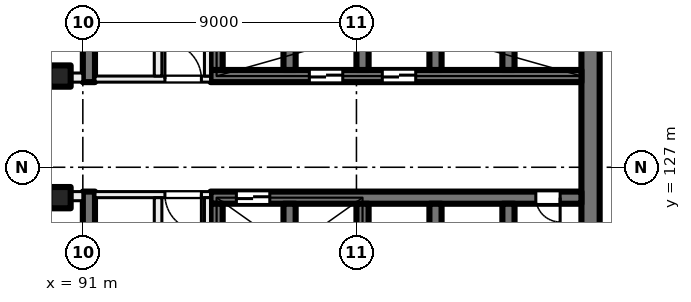
"""IFC4 building model, lengths in metres.
Left out: names, types, materials, properties, quantities, classifications, styles, units other than length and angle.
Written with IfcOpenShell. Run it as: python <this file> out.ifc"""

import sys

from ifc_helpers import new_model, si_unit, direction, frame, frame_2d, origin, origin_2d, place, context, subcontext, project, spatial, rectangle, extrude, element, fill, save


model = new_model("IFC4")
c1 = context("Model", 3, precision=1e-05, world=origin(), true_north=direction((0.0, 1.0)))
c2 = subcontext(c1, "Body", "Model", "MODEL_VIEW")
j1 = project(units=[si_unit("LENGTHUNIT", "METRE"), si_unit("PLANEANGLEUNIT", "RADIAN")], contexts=[c1])
p1 = place(None, origin())
s1 = spatial("IfcSite", under=j1, at=p1, CompositionType="ELEMENT")
p2 = place(p1, origin())
s2 = spatial("IfcBuilding", under=s1, at=p2, CompositionType="ELEMENT")
p3 = place(p2, frame((0.0, 0.0, 67.5)))
s3 = spatial("IfcBuildingStorey", under=s2, at=p3, CompositionType="ELEMENT", Elevation=67.5)
for number, where, z_axis, x_axis in (
    (1, (90.25, 130.0, 0.0), (0.0, 0.0, 1.0), (1.0, 0.0, 0.0)),
    (2, (90.25, 126.0, 0.0), (0.0, 0.0, 1.0), (1.0, 0.0, 0.0)),
):
    element("IfcColumn", number, at=place(p3, frame(where, z_axis=z_axis, x_axis=x_axis)), inside=s3, PredefinedType="COLUMN", context=c2, shape_type="SweptSolid", body=[
        extrude(rectangle(XDim=0.7, YDim=0.7, at=origin_2d()), origin(), (0.0, 0.0, 1.0), 4.0),
    ])
p4 = place(p3, frame((107.7, 135.2, 0.0), z_axis=(0.0, 0.0, 1.0), x_axis=(0.0, -1.0, 0.0)))
e3 = element("IfcWall", 3, at=p4, inside=s3, PredefinedType="SHEAR", context=c2, shape_type="SweptSolid", body=[
    extrude(rectangle(XDim=14.4, YDim=0.6, at=frame_2d((7.2, 0.0))), origin(), (0.0, 0.0, 1.0), 4.0),
])
p5 = place(p3, frame((107.4, 130.0, 0.0), z_axis=(0.0, 0.0, 1.0), x_axis=(-1.0, 0.0, 0.0)))
e4 = element("IfcWall", 4, at=p5, inside=s3, PredefinedType="SHEAR", context=c2, shape_type="SweptSolid", body=[
    extrude(rectangle(XDim=12.2, YDim=0.4, at=frame_2d((6.1, 0.0))), origin(), (0.0, 0.0, 1.0), 4.0),
])
p6 = place(p5, frame((5.45, 0.0, 0.0)))
e5 = element("IfcOpeningElement", 5, at=p6, cuts=e4, PredefinedType="OPENING", context=c2, shape_type="SweptSolid", body=[
    extrude(rectangle(XDim=1.1, YDim=2.1, at=frame_2d((0.55, 1.05))), frame((0.0, 0.21, 0.0), z_axis=(0.0, -1.0, 0.0), x_axis=(1.0, 0.0, 0.0)), (0.0, 0.0, 1.0), 0.42),
])
p7 = place(p5, frame((7.85, 0.0, 0.0)))
e6 = element("IfcOpeningElement", 6, at=p7, cuts=e4, PredefinedType="OPENING", context=c2, shape_type="SweptSolid", body=[
    extrude(rectangle(XDim=1.1, YDim=2.1, at=frame_2d((0.55, 1.05))), frame((0.0, 0.21, 0.0), z_axis=(0.0, -1.0, 0.0), x_axis=(1.0, 0.0, 0.0)), (0.0, 0.0, 1.0), 0.42),
])
for number, where, z_axis, x_axis in (
    (7, (105.0, 133.2, 0.0), (0.0, 0.0, 1.0), (0.0, -1.0, 0.0)),
    (8, (102.6, 133.2, 0.0), (0.0, 0.0, 1.0), (0.0, -1.0, 0.0)),
    (9, (100.2, 133.2, 0.0), (0.0, 0.0, 1.0), (0.0, -1.0, 0.0)),
    (10, (97.8, 133.2, 0.0), (0.0, 0.0, 1.0), (0.0, -1.0, 0.0)),
    (11, (95.4, 133.2, 0.0), (0.0, 0.0, 1.0), (0.0, -1.0, 0.0)),
):
    element("IfcWall", number, at=place(p3, frame(where, z_axis=z_axis, x_axis=x_axis)), inside=s3, PredefinedType="SHEAR", context=c2, shape_type="SweptSolid", body=[
        extrude(rectangle(XDim=3.0, YDim=0.4, at=frame_2d((1.5, 0.0))), origin(), (0.0, 0.0, 1.0), 4.0),
    ])
p8 = place(p3, frame((107.4, 126.0, 0.0), z_axis=(0.0, 0.0, 1.0), x_axis=(-1.0, 0.0, 0.0)))
e12 = element("IfcWall", 12, at=p8, inside=s3, PredefinedType="SHEAR", context=c2, shape_type="SweptSolid", body=[
    extrude(rectangle(XDim=12.2, YDim=0.4, at=frame_2d((6.1, 0.0))), origin(), (0.0, 0.0, 1.0), 4.0),
])
p9 = place(p8, frame((10.25, 0.0, 0.0)))
e13 = element("IfcOpeningElement", 13, at=p9, cuts=e12, PredefinedType="OPENING", context=c2, shape_type="SweptSolid", body=[
    extrude(rectangle(XDim=1.1, YDim=2.1, at=frame_2d((0.55, 1.05))), frame((0.0, 0.21, 0.0), z_axis=(0.0, -1.0, 0.0), x_axis=(1.0, 0.0, 0.0)), (0.0, 0.0, 1.0), 0.42),
])
p10 = place(p8, frame((0.7, 0.0, 0.0)))
e14 = element("IfcOpeningElement", 14, at=p10, cuts=e12, PredefinedType="OPENING", context=c2, shape_type="SweptSolid", body=[
    extrude(rectangle(XDim=0.8, YDim=2.1, at=frame_2d((0.4, 1.05))), frame((0.0, 0.21, 0.0), z_axis=(0.0, -1.0, 0.0), x_axis=(1.0, 0.0, 0.0)), (0.0, 0.0, 1.0), 0.42),
])
for number, where, z_axis, x_axis in (
    (15, (105.0, 125.8, 0.0), (0.0, 0.0, 1.0), (0.0, -1.0, 0.0)),
    (16, (102.6, 125.8, 0.0), (0.0, 0.0, 1.0), (0.0, -1.0, 0.0)),
    (17, (100.2, 125.8, 0.0), (0.0, 0.0, 1.0), (0.0, -1.0, 0.0)),
    (18, (97.8, 125.8, 0.0), (0.0, 0.0, 1.0), (0.0, -1.0, 0.0)),
    (19, (95.4, 125.8, 0.0), (0.0, 0.0, 1.0), (0.0, -1.0, 0.0)),
):
    element("IfcWall", number, at=place(p3, frame(where, z_axis=z_axis, x_axis=x_axis)), inside=s3, PredefinedType="SHEAR", context=c2, shape_type="SweptSolid", body=[
        extrude(rectangle(XDim=3.0, YDim=0.4, at=frame_2d((1.5, 0.0))), origin(), (0.0, 0.0, 1.0), 4.0),
    ])
for number, where, z_axis, x_axis in (
    (20, (91.2, 138.4, 0.0), (0.0, 0.0, 1.0), (0.0, -1.0, 0.0)),
    (21, (91.2, 126.2, 0.0), (0.0, 0.0, 1.0), (0.0, -1.0, 0.0)),
):
    element("IfcWall", number, at=place(p3, frame(where, z_axis=z_axis, x_axis=x_axis)), inside=s3, PredefinedType="SHEAR", context=c2, shape_type="SweptSolid", body=[
        extrude(rectangle(XDim=8.6, YDim=0.4, at=frame_2d((4.3, 0.0))), origin(), (0.0, 0.0, 1.0), 4.0),
    ])
p11 = place(p3, frame((95.2, 126.1, 0.0), z_axis=(0.0, 0.0, 1.0), x_axis=(-1.0, 0.0, 0.0)))
e22 = element("IfcWall", 22, at=p11, inside=s3, PredefinedType="PARTITIONING", context=c2, shape_type="SweptSolid", body=[
    extrude(rectangle(XDim=3.8, YDim=0.2, at=frame_2d((1.9, 0.0))), origin(), (0.0, 0.0, 1.0), 3.625),
])
p12 = place(p11, frame((0.3, 0.0, 0.0)))
e23 = element("IfcOpeningElement", 23, at=p12, cuts=e22, PredefinedType="OPENING", context=c2, shape_type="SweptSolid", body=[
    extrude(rectangle(XDim=1.2, YDim=2.1, at=frame_2d((0.6, 1.05))), frame((0.0, 0.11, 0.0), z_axis=(0.0, -1.0, 0.0), x_axis=(1.0, 0.0, 0.0)), (0.0, 0.0, 1.0), 0.22),
])
p13 = place(p3, frame((95.1, 117.6, 0.0), z_axis=(0.0, 0.0, 1.0), x_axis=(0.0, 1.0, 0.0)))
e24 = element("IfcWall", 24, at=p13, inside=s3, PredefinedType="PARTITIONING", context=c2, shape_type="SweptSolid", body=[
    extrude(rectangle(XDim=8.4, YDim=0.2, at=frame_2d((4.2, 0.0))), origin(), (0.0, 0.0, 1.0), 3.625),
])
p14 = place(p13, frame((1.65, 0.0, 0.0)))
e25 = element("IfcOpeningElement", 25, at=p14, cuts=e24, PredefinedType="OPENING", context=c2, shape_type="SweptSolid", body=[
    extrude(rectangle(XDim=1.5, YDim=2.1, at=frame_2d((0.75, 1.05))), frame((0.0, 0.11, 0.0), z_axis=(0.0, -1.0, 0.0), x_axis=(1.0, 0.0, 0.0)), (0.0, 0.0, 1.0), 0.22),
])
p15 = place(p3, frame((93.475, 117.6, 0.0), z_axis=(0.0, 0.0, 1.0), x_axis=(0.0, 1.0, 0.0)))
e26 = element("IfcWall", 26, at=p15, inside=s3, PredefinedType="PARTITIONING", context=c2, shape_type="SweptSolid", body=[
    extrude(rectangle(XDim=8.4, YDim=0.25, at=frame_2d((4.2, 0.0))), origin(), (0.0, 0.0, 1.0), 3.625),
])
p16 = place(p15, frame((5.825, 0.0, 0.0)))
e27 = element("IfcOpeningElement", 27, at=p16, cuts=e26, PredefinedType="OPENING", context=c2, shape_type="SweptSolid", body=[
    extrude(rectangle(XDim=1.0, YDim=2.1, at=frame_2d((0.5, 1.05))), frame((0.0, 0.135, 0.0), z_axis=(0.0, -1.0, 0.0), x_axis=(1.0, 0.0, 0.0)), (0.0, 0.0, 1.0), 0.27),
])
p17 = place(p15, frame((1.675, 0.0, 0.0)))
e28 = element("IfcOpeningElement", 28, at=p17, cuts=e26, PredefinedType="OPENING", context=c2, shape_type="SweptSolid", body=[
    extrude(rectangle(XDim=0.8, YDim=2.1, at=frame_2d((0.4, 1.05))), frame((0.0, 0.135, 0.0), z_axis=(0.0, -1.0, 0.0), x_axis=(1.0, 0.0, 0.0)), (0.0, 0.0, 1.0), 0.27),
])
p18 = place(p3, frame((91.4, 129.9, 0.0), z_axis=(0.0, 0.0, 1.0), x_axis=(1.0, 0.0, 0.0)))
e29 = element("IfcWall", 29, at=p18, inside=s3, PredefinedType="PARTITIONING", context=c2, shape_type="SweptSolid", body=[
    extrude(rectangle(XDim=3.8, YDim=0.2, at=frame_2d((1.9, 0.0))), origin(), (0.0, 0.0, 1.0), 3.625),
])
p19 = place(p18, frame((2.3, 0.0, 0.0)))
e30 = element("IfcOpeningElement", 30, at=p19, cuts=e29, PredefinedType="OPENING", context=c2, shape_type="SweptSolid", body=[
    extrude(rectangle(XDim=1.2, YDim=2.1, at=frame_2d((0.6, 1.05))), frame((0.0, 0.11, 0.0), z_axis=(0.0, -1.0, 0.0), x_axis=(1.0, 0.0, 0.0)), (0.0, 0.0, 1.0), 0.22),
])
p20 = place(p3, frame((95.1, 130.0, 0.0), z_axis=(0.0, 0.0, 1.0), x_axis=(0.0, 1.0, 0.0)))
e31 = element("IfcWall", 31, at=p20, inside=s3, PredefinedType="PARTITIONING", context=c2, shape_type="SweptSolid", body=[
    extrude(rectangle(XDim=8.4, YDim=0.2, at=frame_2d((4.2, 0.0))), origin(), (0.0, 0.0, 1.0), 3.625),
])
p21 = place(p20, frame((5.25, 0.0, 0.0)))
e32 = element("IfcOpeningElement", 32, at=p21, cuts=e31, PredefinedType="OPENING", context=c2, shape_type="SweptSolid", body=[
    extrude(rectangle(XDim=1.5, YDim=2.1, at=frame_2d((0.75, 1.05))), frame((0.0, 0.11, 0.0), z_axis=(0.0, -1.0, 0.0), x_axis=(1.0, 0.0, 0.0)), (0.0, 0.0, 1.0), 0.22),
])
p22 = place(p3, frame((93.475, 130.0, 0.0), z_axis=(0.0, 0.0, 1.0), x_axis=(0.0, 1.0, 0.0)))
e33 = element("IfcWall", 33, at=p22, inside=s3, PredefinedType="PARTITIONING", context=c2, shape_type="SweptSolid", body=[
    extrude(rectangle(XDim=8.4, YDim=0.25, at=frame_2d((4.2, 0.0))), origin(), (0.0, 0.0, 1.0), 3.625),
])
p23 = place(p22, frame((1.675, 0.0, 0.0)))
e34 = element("IfcOpeningElement", 34, at=p23, cuts=e33, PredefinedType="OPENING", context=c2, shape_type="SweptSolid", body=[
    extrude(rectangle(XDim=0.8, YDim=2.1, at=frame_2d((0.4, 1.05))), frame((0.0, 0.135, 0.0), z_axis=(0.0, -1.0, 0.0), x_axis=(1.0, 0.0, 0.0)), (0.0, 0.0, 1.0), 0.27),
])
p24 = place(p22, frame((5.825, 0.0, 0.0)))
e35 = element("IfcOpeningElement", 35, at=p24, cuts=e33, PredefinedType="OPENING", context=c2, shape_type="SweptSolid", body=[
    extrude(rectangle(XDim=1.0, YDim=2.1, at=frame_2d((0.5, 1.05))), frame((0.0, 0.135, 0.0), z_axis=(0.0, -1.0, 0.0), x_axis=(1.0, 0.0, 0.0)), (0.0, 0.0, 1.0), 0.27),
])
p25 = place(p3, frame((72.5, 129.95, 0.0), z_axis=(0.0, 0.0, 1.0), x_axis=(1.0, 0.0, 0.0)))
e36 = element("IfcWall", 36, at=p25, inside=s3, PredefinedType="PARTITIONING", context=c2, shape_type="SweptSolid", body=[
    extrude(rectangle(XDim=18.5, YDim=0.3, at=frame_2d((9.25, 0.0))), origin(), (0.0, 0.0, 1.0), 3.625),
])
p26 = place(p25, frame((10.475, 0.0, 0.0)))
e37 = element("IfcOpeningElement", 37, at=p26, cuts=e36, PredefinedType="OPENING", context=c2, shape_type="SweptSolid", body=[
    extrude(rectangle(XDim=1.8, YDim=2.1, at=frame_2d((0.9, 1.05))), frame((0.0, 0.16, 0.0), z_axis=(0.0, -1.0, 0.0), x_axis=(1.0, 0.0, 0.0)), (0.0, 0.0, 1.0), 0.32),
])
p27 = place(p25, frame((1.225, 0.0, 0.0)))
e38 = element("IfcOpeningElement", 38, at=p27, cuts=e36, PredefinedType="OPENING", context=c2, shape_type="SweptSolid", body=[
    extrude(rectangle(XDim=1.8, YDim=2.1, at=frame_2d((0.9, 1.05))), frame((0.0, 0.16, 0.0), z_axis=(0.0, -1.0, 0.0), x_axis=(1.0, 0.0, 0.0)), (0.0, 0.0, 1.0), 0.32),
])
p28 = place(p3, frame((91.0, 126.05, 0.0), z_axis=(0.0, 0.0, 1.0), x_axis=(-1.0, 0.0, 0.0)))
e39 = element("IfcWall", 39, at=p28, inside=s3, PredefinedType="PARTITIONING", context=c2, shape_type="SweptSolid", body=[
    extrude(rectangle(XDim=43.785, YDim=0.3, at=frame_2d((21.893, 0.0))), origin(), (0.0, 0.0, 1.0), 3.625),
])
p29 = place(p28, frame((2.125, 0.0, 0.0)))
e40 = element("IfcOpeningElement", 40, at=p29, cuts=e39, PredefinedType="OPENING", context=c2, shape_type="SweptSolid", body=[
    extrude(rectangle(XDim=1.0, YDim=2.1, at=frame_2d((0.5, 1.05))), frame((0.0, 0.16, 0.0), z_axis=(0.0, -1.0, 0.0), x_axis=(1.0, 0.0, 0.0)), (0.0, 0.0, 1.0), 0.32),
])
p30 = place(p28, frame((7.0, 0.0, 0.0)))
e41 = element("IfcOpeningElement", 41, at=p30, cuts=e39, PredefinedType="OPENING", context=c2, shape_type="SweptSolid", body=[
    extrude(rectangle(XDim=1.0, YDim=2.1, at=frame_2d((0.5, 1.05))), frame((0.0, 0.16, 0.0), z_axis=(0.0, -1.0, 0.0), x_axis=(1.0, 0.0, 0.0)), (0.0, 0.0, 1.0), 0.32),
])
p31 = place(p28, frame((11.5, 0.0, 0.0)))
e42 = element("IfcOpeningElement", 42, at=p31, cuts=e39, PredefinedType="OPENING", context=c2, shape_type="SweptSolid", body=[
    extrude(rectangle(XDim=1.0, YDim=2.1, at=frame_2d((0.5, 1.05))), frame((0.0, 0.16, 0.0), z_axis=(0.0, -1.0, 0.0), x_axis=(1.0, 0.0, 0.0)), (0.0, 0.0, 1.0), 0.32),
])
p32 = place(p28, frame((21.35, 0.0, 0.0)))
e43 = element("IfcOpeningElement", 43, at=p32, cuts=e39, PredefinedType="OPENING", context=c2, shape_type="SweptSolid", body=[
    extrude(rectangle(XDim=0.8, YDim=2.1, at=frame_2d((0.4, 1.05))), frame((0.0, 0.16, 0.0), z_axis=(0.0, -1.0, 0.0), x_axis=(1.0, 0.0, 0.0)), (0.0, 0.0, 1.0), 0.32),
])
p33 = place(p28, frame((16.75, 0.0, 0.0)))
e44 = element("IfcOpeningElement", 44, at=p33, cuts=e39, PredefinedType="OPENING", context=c2, shape_type="SweptSolid", body=[
    extrude(rectangle(XDim=1.0, YDim=2.1, at=frame_2d((0.5, 1.05))), frame((0.0, 0.16, 0.0), z_axis=(0.0, -1.0, 0.0), x_axis=(1.0, 0.0, 0.0)), (0.0, 0.0, 1.0), 0.32),
])
p34 = place(p28, frame((25.0, 0.0, 0.0)))
e45 = element("IfcOpeningElement", 45, at=p34, cuts=e39, PredefinedType="OPENING", context=c2, shape_type="SweptSolid", body=[
    extrude(rectangle(XDim=1.0, YDim=2.1, at=frame_2d((0.5, 1.05))), frame((0.0, 0.16, 0.0), z_axis=(0.0, -1.0, 0.0), x_axis=(1.0, 0.0, 0.0)), (0.0, 0.0, 1.0), 0.32),
])
p35 = place(p28, frame((39.296, 0.0, 0.0)))
e46 = element("IfcOpeningElement", 46, at=p35, cuts=e39, PredefinedType="OPENING", context=c2, shape_type="SweptSolid", body=[
    extrude(rectangle(XDim=1.8, YDim=2.1, at=frame_2d((0.9, 1.05))), frame((0.0, 0.16, 0.0), z_axis=(0.0, -1.0, 0.0), x_axis=(1.0, 0.0, 0.0)), (0.0, 0.0, 1.0), 0.32),
])
p36 = place(p9, origin())
e47 = element("IfcDoor", 47, at=p36, inside=s3, OperationType="DOUBLE_DOOR_SLIDING", PredefinedType="DOOR", context=c2, shape_type="SweptSolid", body=[
    extrude(rectangle(XDim=1.1, YDim=2.1, at=frame_2d((0.55, 1.05))), frame((0.0, 0.025, 0.0), z_axis=(0.0, -1.0, 0.0), x_axis=(1.0, 0.0, 0.0)), (0.0, 0.0, 1.0), 0.05),
])
fill(e13, e47)
p37 = place(p6, origin())
e48 = element("IfcDoor", 48, at=p37, inside=s3, OperationType="DOUBLE_DOOR_SLIDING", PredefinedType="DOOR", context=c2, shape_type="SweptSolid", body=[
    extrude(rectangle(XDim=1.1, YDim=2.1, at=frame_2d((0.55, 1.05))), frame((0.0, 0.025, 0.0), z_axis=(0.0, -1.0, 0.0), x_axis=(1.0, 0.0, 0.0)), (0.0, 0.0, 1.0), 0.05),
])
fill(e5, e48)
p38 = place(p7, origin())
e49 = element("IfcDoor", 49, at=p38, inside=s3, OperationType="DOUBLE_DOOR_SLIDING", PredefinedType="DOOR", context=c2, shape_type="SweptSolid", body=[
    extrude(rectangle(XDim=1.1, YDim=2.1, at=frame_2d((0.55, 1.05))), frame((0.0, 0.025, 0.0), z_axis=(0.0, -1.0, 0.0), x_axis=(1.0, 0.0, 0.0)), (0.0, 0.0, 1.0), 0.05),
])
fill(e6, e49)
p39 = place(p10, origin())
e50 = element("IfcDoor", 50, at=p39, inside=s3, OperationType="SINGLE_SWING_LEFT", PredefinedType="DOOR", context=c2, shape_type="SweptSolid", body=[
    extrude(rectangle(XDim=0.8, YDim=2.1, at=frame_2d((0.4, 1.05))), frame((0.0, 0.025, 0.0), z_axis=(0.0, -1.0, 0.0), x_axis=(1.0, 0.0, 0.0)), (0.0, 0.0, 1.0), 0.05),
])
fill(e14, e50)
p40 = place(p12, origin())
e51 = element("IfcDoor", 51, at=p40, inside=s3, OperationType="DOUBLE_DOOR_SINGLE_SWING", PredefinedType="DOOR", context=c2, shape_type="SweptSolid", body=[
    extrude(rectangle(XDim=1.2, YDim=2.1, at=frame_2d((0.6, 1.05))), frame((0.0, 0.025, 0.0), z_axis=(0.0, -1.0, 0.0), x_axis=(1.0, 0.0, 0.0)), (0.0, 0.0, 1.0), 0.05),
])
fill(e23, e51)
p41 = place(p19, origin())
e52 = element("IfcDoor", 52, at=p41, inside=s3, OperationType="DOUBLE_DOOR_SINGLE_SWING", PredefinedType="DOOR", context=c2, shape_type="SweptSolid", body=[
    extrude(rectangle(XDim=1.2, YDim=2.1, at=frame_2d((0.6, 1.05))), frame((0.0, 0.025, 0.0), z_axis=(0.0, -1.0, 0.0), x_axis=(1.0, 0.0, 0.0)), (0.0, 0.0, 1.0), 0.05),
])
fill(e30, e52)
save(model, sys.argv[1])
